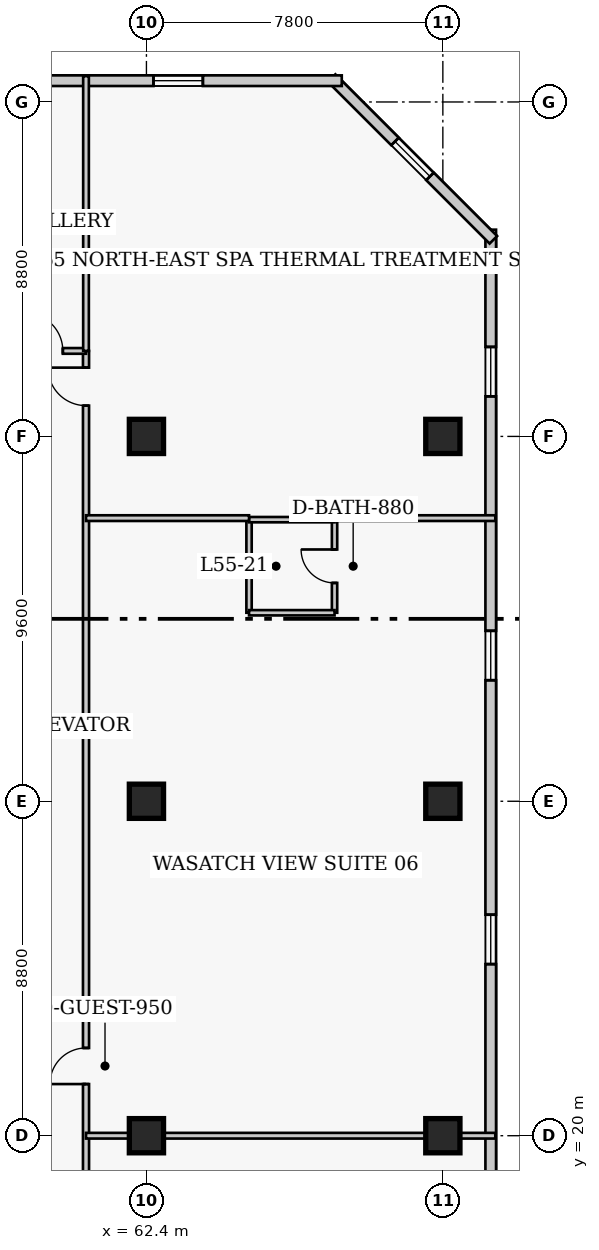
"""IFC4 building model, lengths in metres.
Left out: names, types, materials, properties, quantities, classifications, styles, units other than length and angle.
Written with IfcOpenShell. Run it as: python <this file> out.ifc"""

import sys

from ifc_helpers import new_model, si_unit, direction, frame, frame_2d, origin, origin_2d, place, context, subcontext, project, spatial, rectangle, extrude, element, fill, save


model = new_model("IFC4")
c1 = context("Model", 3, precision=1e-05, world=origin(), true_north=direction((0.0, 1.0)))
c2 = subcontext(c1, "Body", "Model", "MODEL_VIEW")
j1 = project(units=[si_unit("LENGTHUNIT", "METRE"), si_unit("PLANEANGLEUNIT", "RADIAN")], contexts=[c1])
p1 = place(None, origin())
s1 = spatial("IfcSite", under=j1, at=p1, CompositionType="ELEMENT")
p2 = place(p1, origin())
s2 = spatial("IfcBuilding", under=s1, at=p2, CompositionType="ELEMENT")
p3 = place(p2, frame((0.0, 0.0, 220.2)))
s3 = spatial("IfcBuildingStorey", under=s2, at=p3, CompositionType="ELEMENT", Elevation=220.2)
for number, where, z_axis, x_axis in (
    (1, (62.4, 20.0, 0.0), (0.0, 0.0, 1.0), (1.0, 0.0, 0.0)),
    (2, (62.4, 28.8, 0.0), (0.0, 0.0, 1.0), (1.0, 0.0, 0.0)),
    (3, (62.4, 38.4, 0.0), (0.0, 0.0, 1.0), (1.0, 0.0, 0.0)),
    (4, (70.2, 20.0, 0.0), (0.0, 0.0, 1.0), (1.0, 0.0, 0.0)),
    (5, (70.2, 28.8, 0.0), (0.0, 0.0, 1.0), (1.0, 0.0, 0.0)),
    (6, (70.2, 38.4, 0.0), (0.0, 0.0, 1.0), (1.0, 0.0, 0.0)),
):
    element("IfcColumn", number, at=place(p3, frame(where, z_axis=z_axis, x_axis=x_axis)), inside=s3, PredefinedType="COLUMN", context=c2, shape_type="SweptSolid", body=[
        extrude(rectangle(XDim=0.9, YDim=0.9, at=origin_2d()), origin(), (0.0, 0.0, 1.0), 3.9),
    ])
p4 = place(p3, frame((71.46, 13.96, 0.0), z_axis=(0.0, 0.0, 1.0), x_axis=(0.0, 1.0, 0.0)))
e7 = element("IfcWall", 7, at=p4, inside=s3, PredefinedType="SOLIDWALL", context=c2, shape_type="SweptSolid", body=[
    extrude(rectangle(XDim=29.88, YDim=0.28, at=frame_2d((14.94, 0.0))), origin(), (0.0, 0.0, 1.0), 3.65),
])
p5 = place(p4, frame((3.085, 0.0, 0.85)))
e8 = element("IfcOpeningElement", 8, at=p5, cuts=e7, PredefinedType="OPENING", context=c2, shape_type="SweptSolid", body=[
    extrude(rectangle(XDim=1.3, YDim=1.7, at=frame_2d((0.65, 0.85))), frame((0.0, 0.15, 0.0), z_axis=(0.0, -1.0, 0.0), x_axis=(1.0, 0.0, 0.0)), (0.0, 0.0, 1.0), 0.3),
])
p6 = place(p4, frame((10.555, 0.0, 0.85)))
e9 = element("IfcOpeningElement", 9, at=p6, cuts=e7, PredefinedType="OPENING", context=c2, shape_type="SweptSolid", body=[
    extrude(rectangle(XDim=1.3, YDim=1.7, at=frame_2d((0.65, 0.85))), frame((0.0, 0.15, 0.0), z_axis=(0.0, -1.0, 0.0), x_axis=(1.0, 0.0, 0.0)), (0.0, 0.0, 1.0), 0.3),
])
p7 = place(p4, frame((18.025, 0.0, 0.85)))
e10 = element("IfcOpeningElement", 10, at=p7, cuts=e7, PredefinedType="OPENING", context=c2, shape_type="SweptSolid", body=[
    extrude(rectangle(XDim=1.3, YDim=1.7, at=frame_2d((0.65, 0.85))), frame((0.0, 0.15, 0.0), z_axis=(0.0, -1.0, 0.0), x_axis=(1.0, 0.0, 0.0)), (0.0, 0.0, 1.0), 0.3),
])
p8 = place(p4, frame((25.495, 0.0, 0.85)))
e11 = element("IfcOpeningElement", 11, at=p8, cuts=e7, PredefinedType="OPENING", context=c2, shape_type="SweptSolid", body=[
    extrude(rectangle(XDim=1.3, YDim=1.7, at=frame_2d((0.65, 0.85))), frame((0.0, 0.15, 0.0), z_axis=(0.0, -1.0, 0.0), x_axis=(1.0, 0.0, 0.0)), (0.0, 0.0, 1.0), 0.3),
])
p9 = place(p3, frame((71.529, 43.573, 0.0), z_axis=(0.0, 0.0, 1.0), x_axis=(-0.707106781187, 0.707106781187, 0.0)))
e12 = element("IfcWall", 12, at=p9, inside=s3, PredefinedType="SOLIDWALL", context=c2, shape_type="SweptSolid", body=[
    extrude(rectangle(XDim=6.02, YDim=0.28, at=frame_2d((3.01, 0.0))), origin(), (0.0, 0.0, 1.0), 3.65),
])
p10 = place(p9, frame((2.36, 0.0, 0.85)))
e13 = element("IfcOpeningElement", 13, at=p10, cuts=e12, PredefinedType="OPENING", context=c2, shape_type="SweptSolid", body=[
    extrude(rectangle(XDim=1.3, YDim=1.7, at=frame_2d((0.65, 0.85))), frame((0.0, 0.15, 0.0), z_axis=(0.0, -1.0, 0.0), x_axis=(1.0, 0.0, 0.0)), (0.0, 0.0, 1.0), 0.3),
])
p11 = place(p3, frame((67.54, 47.76, 0.0), z_axis=(0.0, 0.0, 1.0), x_axis=(-1.0, 0.0, 0.0)))
e14 = element("IfcWall", 14, at=p11, inside=s3, PredefinedType="SOLIDWALL", context=c2, shape_type="SweptSolid", body=[
    extrude(rectangle(XDim=25.83, YDim=0.28, at=frame_2d((12.915, 0.0))), origin(), (0.0, 0.0, 1.0), 3.65),
])
p12 = place(p11, frame((16.14, 0.0, 0.0)))
e15 = element("IfcOpeningElement", 15, at=p12, cuts=e14, PredefinedType="OPENING", context=c2, shape_type="SweptSolid", body=[
    extrude(rectangle(XDim=1.4, YDim=2.15, at=frame_2d((0.7, 1.075))), frame((0.0, 0.15, 0.0), z_axis=(0.0, -1.0, 0.0), x_axis=(1.0, 0.0, 0.0)), (0.0, 0.0, 1.0), 0.3),
])
p13 = place(p11, frame((3.655, 0.0, 0.85)))
e16 = element("IfcOpeningElement", 16, at=p13, cuts=e14, PredefinedType="OPENING", context=c2, shape_type="SweptSolid", body=[
    extrude(rectangle(XDim=1.3, YDim=1.7, at=frame_2d((0.65, 0.85))), frame((0.0, 0.15, 0.0), z_axis=(0.0, -1.0, 0.0), x_axis=(1.0, 0.0, 0.0)), (0.0, 0.0, 1.0), 0.3),
])
p14 = place(p11, frame((22.025, 0.0, 0.85)))
e17 = element("IfcOpeningElement", 17, at=p14, cuts=e14, PredefinedType="OPENING", context=c2, shape_type="SweptSolid", body=[
    extrude(rectangle(XDim=1.3, YDim=1.7, at=frame_2d((0.65, 0.85))), frame((0.0, 0.15, 0.0), z_axis=(0.0, -1.0, 0.0), x_axis=(1.0, 0.0, 0.0)), (0.0, 0.0, 1.0), 0.3),
])
p15 = place(p3, frame((60.81, 11.95, 0.0), z_axis=(0.0, 0.0, 1.0), x_axis=(0.0, 1.0, 0.0)))
e18 = element("IfcWall", 18, at=p15, inside=s3, PredefinedType="PARTITIONING", context=c2, shape_type="SweptSolid", body=[
    extrude(rectangle(XDim=28.7, YDim=0.16, at=frame_2d((14.35, 0.0))), origin(), (0.0, 0.0, 1.0), 3.65),
])
p16 = place(p15, frame((3.55, 0.0, 0.0)))
e19 = element("IfcOpeningElement", 19, at=p16, cuts=e18, PredefinedType="OPENING", context=c2, shape_type="SweptSolid", body=[
    extrude(rectangle(XDim=0.95, YDim=2.1, at=frame_2d((0.475, 1.05))), frame((0.0, 0.09, 0.0), z_axis=(0.0, -1.0, 0.0), x_axis=(1.0, 0.0, 0.0)), (0.0, 0.0, 1.0), 0.18),
])
p17 = place(p15, frame((9.409, 0.0, 0.0)))
e20 = element("IfcOpeningElement", 20, at=p17, cuts=e18, PredefinedType="OPENING", context=c2, shape_type="SweptSolid", body=[
    extrude(rectangle(XDim=0.95, YDim=2.1, at=frame_2d((0.475, 1.05))), frame((0.0, 0.09, 0.0), z_axis=(0.0, -1.0, 0.0), x_axis=(1.0, 0.0, 0.0)), (0.0, 0.0, 1.0), 0.18),
])
p18 = place(p15, frame((27.26, 0.0, 0.0)))
e21 = element("IfcOpeningElement", 21, at=p18, cuts=e18, PredefinedType="OPENING", context=c2, shape_type="SweptSolid", body=[
    extrude(rectangle(XDim=1.0, YDim=2.15, at=frame_2d((0.5, 1.075))), frame((0.0, 0.09, 0.0), z_axis=(0.0, -1.0, 0.0), x_axis=(1.0, 0.0, 0.0)), (0.0, 0.0, 1.0), 0.18),
])
p19 = place(p3, frame((56.8, 40.65, 0.0), z_axis=(0.0, 0.0, 1.0), x_axis=(1.0, 0.0, 0.0)))
e22 = element("IfcWall", 22, at=p19, inside=s3, PredefinedType="PARTITIONING", context=c2, shape_type="SweptSolid", body=[
    extrude(rectangle(XDim=4.01, YDim=0.15, at=frame_2d((2.005, 0.0))), origin(), (0.0, 0.0, 1.0), 3.65),
])
p20 = place(p19, frame((2.4, 0.0, 0.0)))
e23 = element("IfcOpeningElement", 23, at=p20, cuts=e22, PredefinedType="OPENING", context=c2, shape_type="SweptSolid", body=[
    extrude(rectangle(XDim=1.0, YDim=2.15, at=frame_2d((0.5, 1.075))), frame((0.0, 0.085, 0.0), z_axis=(0.0, -1.0, 0.0), x_axis=(1.0, 0.0, 0.0)), (0.0, 0.0, 1.0), 0.17),
])
p21 = place(p3, frame((60.81, 40.65, 0.0), z_axis=(0.0, 0.0, 1.0), x_axis=(0.0, 1.0, 0.0)))
e24 = element("IfcWall", 24, at=p21, inside=s3, PredefinedType="PARTITIONING", context=c2, shape_type="SweptSolid", body=[
    extrude(rectangle(XDim=7.23, YDim=0.15, at=frame_2d((3.615, 0.0))), origin(), (0.0, 0.0, 1.0), 3.65),
])
p22 = place(p3, frame((60.81, 20.0, 0.0), z_axis=(0.0, 0.0, 1.0), x_axis=(1.0, 0.0, 0.0)))
e25 = element("IfcWall", 25, at=p22, inside=s3, PredefinedType="PARTITIONING", context=c2, shape_type="SweptSolid", body=[
    extrude(rectangle(XDim=10.77, YDim=0.15, at=frame_2d((5.385, 0.0))), origin(), (0.0, 0.0, 1.0), 2.878),
])
p23 = place(p3, frame((65.1, 33.76, 0.0), z_axis=(0.0, 0.0, 1.0), x_axis=(0.0, 1.0, 0.0)))
e26 = element("IfcWall", 26, at=p23, inside=s3, PredefinedType="PLUMBINGWALL", context=c2, shape_type="SweptSolid", body=[
    extrude(rectangle(XDim=2.45, YDim=0.14, at=frame_2d((1.225, 0.0))), origin(), (0.0, 0.0, 1.0), 3.65),
])
p24 = place(p3, frame((67.35, 33.76, 0.0), z_axis=(0.0, 0.0, 1.0), x_axis=(0.0, 1.0, 0.0)))
e27 = element("IfcWall", 27, at=p24, inside=s3, PredefinedType="PLUMBINGWALL", context=c2, shape_type="SweptSolid", body=[
    extrude(rectangle(XDim=2.45, YDim=0.14, at=frame_2d((1.225, 0.0))), origin(), (0.0, 0.0, 1.0), 3.65),
])
p25 = place(p24, frame((0.785, 0.0, 0.0)))
e28 = element("IfcOpeningElement", 28, at=p25, cuts=e27, PredefinedType="OPENING", context=c2, shape_type="SweptSolid", body=[
    extrude(rectangle(XDim=0.88, YDim=2.05, at=frame_2d((0.44, 1.025))), frame((0.0, 0.08, 0.0), z_axis=(0.0, -1.0, 0.0), x_axis=(1.0, 0.0, 0.0)), (0.0, 0.0, 1.0), 0.16),
])
for number, where, z_axis, x_axis in (
    (29, (65.1, 33.76, 0.0), (0.0, 0.0, 1.0), (1.0, 0.0, 0.0)),
    (30, (65.1, 36.21, 0.0), (0.0, 0.0, 1.0), (1.0, 0.0, 0.0)),
):
    element("IfcWall", number, at=place(p3, frame(where, z_axis=z_axis, x_axis=x_axis)), inside=s3, PredefinedType="PLUMBINGWALL", context=c2, shape_type="SweptSolid", body=[
        extrude(rectangle(XDim=2.25, YDim=0.14, at=frame_2d((1.125, 0.0))), origin(), (0.0, 0.0, 1.0), 3.65),
    ])
p26 = place(p3, frame((60.81, 36.25, 0.0), z_axis=(0.0, 0.0, 1.0), x_axis=(1.0, 0.0, 0.0)))
e31 = element("IfcWall", 31, at=p26, inside=s3, PredefinedType="PARTITIONING", context=c2, shape_type="SweptSolid", body=[
    extrude(rectangle(XDim=4.29, YDim=0.15, at=frame_2d((2.145, 0.0))), origin(), (0.0, 0.0, 1.0), 3.65),
])
p27 = place(p3, frame((67.35, 36.25, 0.0), z_axis=(0.0, 0.0, 1.0), x_axis=(1.0, 0.0, 0.0)))
e32 = element("IfcWall", 32, at=p27, inside=s3, PredefinedType="PARTITIONING", context=c2, shape_type="SweptSolid", body=[
    extrude(rectangle(XDim=4.23, YDim=0.15, at=frame_2d((2.115, 0.0))), origin(), (0.0, 0.0, 1.0), 3.65),
])
p28 = place(p6, origin())
e33 = element("IfcWindow", 33, at=p28, inside=s3, PartitioningType="SINGLE_PANEL", PredefinedType="WINDOW", context=c2, shape_type="SweptSolid", body=[
    extrude(rectangle(XDim=1.3, YDim=1.7, at=frame_2d((0.65, 0.85))), frame((0.0, 0.03, 0.0), z_axis=(0.0, -1.0, 0.0), x_axis=(1.0, 0.0, 0.0)), (0.0, 0.0, 1.0), 0.06),
])
fill(e9, e33)
p29 = place(p7, origin())
e34 = element("IfcWindow", 34, at=p29, inside=s3, PartitioningType="SINGLE_PANEL", PredefinedType="WINDOW", context=c2, shape_type="SweptSolid", body=[
    extrude(rectangle(XDim=1.3, YDim=1.7, at=frame_2d((0.65, 0.85))), frame((0.0, 0.03, 0.0), z_axis=(0.0, -1.0, 0.0), x_axis=(1.0, 0.0, 0.0)), (0.0, 0.0, 1.0), 0.06),
])
fill(e10, e34)
p30 = place(p8, origin())
e35 = element("IfcWindow", 35, at=p30, inside=s3, PartitioningType="SINGLE_PANEL", PredefinedType="WINDOW", context=c2, shape_type="SweptSolid", body=[
    extrude(rectangle(XDim=1.3, YDim=1.7, at=frame_2d((0.65, 0.85))), frame((0.0, 0.03, 0.0), z_axis=(0.0, -1.0, 0.0), x_axis=(1.0, 0.0, 0.0)), (0.0, 0.0, 1.0), 0.06),
])
fill(e11, e35)
p31 = place(p10, origin())
e36 = element("IfcWindow", 36, at=p31, inside=s3, PartitioningType="SINGLE_PANEL", PredefinedType="WINDOW", context=c2, shape_type="SweptSolid", body=[
    extrude(rectangle(XDim=1.3, YDim=1.7, at=frame_2d((0.65, 0.85))), frame((0.0, 0.03, 0.0), z_axis=(0.0, -1.0, 0.0), x_axis=(1.0, 0.0, 0.0)), (0.0, 0.0, 1.0), 0.06),
])
fill(e13, e36)
p32 = place(p13, origin())
e37 = element("IfcWindow", 37, at=p32, inside=s3, PartitioningType="SINGLE_PANEL", PredefinedType="WINDOW", context=c2, shape_type="SweptSolid", body=[
    extrude(rectangle(XDim=1.3, YDim=1.7, at=frame_2d((0.65, 0.85))), frame((0.0, 0.03, 0.0), z_axis=(0.0, -1.0, 0.0), x_axis=(1.0, 0.0, 0.0)), (0.0, 0.0, 1.0), 0.06),
])
fill(e16, e37)
p33 = place(p20, origin())
e38 = element("IfcDoor", 38, at=p33, inside=s3, OperationType="SINGLE_SWING_LEFT", PredefinedType="DOOR", context=c2, shape_type="SweptSolid", body=[
    extrude(rectangle(XDim=1.0, YDim=2.15, at=frame_2d((0.5, 1.075))), frame((0.0, 0.025, 0.0), z_axis=(0.0, -1.0, 0.0), x_axis=(1.0, 0.0, 0.0)), (0.0, 0.0, 1.0), 0.05),
])
fill(e23, e38)
p34 = place(p25, origin())
e39 = element("IfcDoor", 39, at=p34, inside=s3, OperationType="SINGLE_SWING_RIGHT", PredefinedType="DOOR", context=c2, shape_type="SweptSolid", body=[
    extrude(rectangle(XDim=0.88, YDim=2.05, at=frame_2d((0.44, 1.025))), frame((0.0, 0.025, 0.0), z_axis=(0.0, -1.0, 0.0), x_axis=(1.0, 0.0, 0.0)), (0.0, 0.0, 1.0), 0.05),
])
fill(e28, e39)
p35 = place(p17, origin())
e40 = element("IfcDoor", 40, at=p35, inside=s3, OperationType="SINGLE_SWING_LEFT", PredefinedType="DOOR", context=c2, shape_type="SweptSolid", body=[
    extrude(rectangle(XDim=0.95, YDim=2.1, at=frame_2d((0.475, 1.05))), frame((0.0, 0.025, 0.0), z_axis=(0.0, -1.0, 0.0), x_axis=(1.0, 0.0, 0.0)), (0.0, 0.0, 1.0), 0.05),
])
fill(e20, e40)
p36 = place(p18, origin())
e41 = element("IfcDoor", 41, at=p36, inside=s3, OperationType="SINGLE_SWING_RIGHT", PredefinedType="DOOR", context=c2, shape_type="SweptSolid", body=[
    extrude(rectangle(XDim=1.0, YDim=2.15, at=frame_2d((0.5, 1.075))), frame((0.0, 0.025, 0.0), z_axis=(0.0, -1.0, 0.0), x_axis=(1.0, 0.0, 0.0)), (0.0, 0.0, 1.0), 0.05),
])
fill(e21, e41)
save(model, sys.argv[1])
